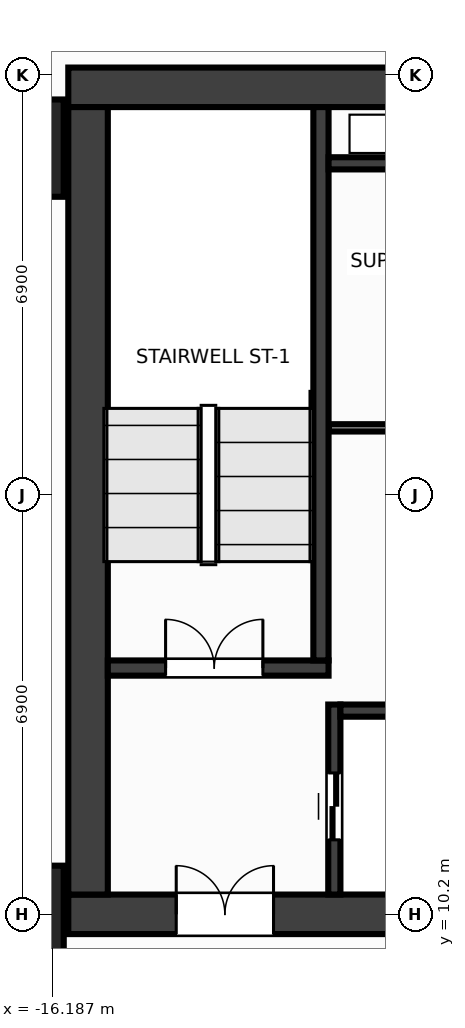
"""IFC4 building model, lengths in metres.
Left out: names, types, materials, properties, quantities, classifications, styles, units other than length and angle.
Written with IfcOpenShell. Run it as: python <this file> out.ifc"""

import sys

from ifc_helpers import new_model, si_unit, direction, frame, frame_2d, origin, origin_2d, place, context, subcontext, project, spatial, rectangle, extrude, source, transform, mapped, element, fill, save


model = new_model("IFC4")
c1 = context("Model", 3, precision=1e-05, world=origin(), true_north=direction((0.0, 1.0)))
c2 = subcontext(c1, "Body", "Model", "MODEL_VIEW")
j1 = project(units=[si_unit("LENGTHUNIT", "METRE"), si_unit("PLANEANGLEUNIT", "RADIAN")], contexts=[c1])
p1 = place(None, origin())
s1 = spatial("IfcSite", under=j1, at=p1, CompositionType="ELEMENT")
p2 = place(p1, origin())
s2 = spatial("IfcBuilding", under=s1, at=p2, CompositionType="ELEMENT")
p3 = place(p2, frame((0.0, 0.0, 120.8)))
s3 = spatial("IfcBuildingStorey", under=s2, at=p3, CompositionType="ELEMENT", Elevation=120.8)
m1 = source(origin(), c2, "Body", "SweptSolid", [
    extrude(rectangle(XDim=31.85, YDim=0.65, at=frame_2d((15.925, 0.0))), origin(), (0.0, 0.0, 1.0), 3.6),
])
p4 = place(p3, frame((-15.925, 23.8, 0.0), z_axis=(0.0, 0.0, 1.0), x_axis=(1.0, 0.0, 0.0)))
e1 = element("IfcWall", 1, at=p4, inside=s3, PredefinedType="SHEAR", context=c2, shape_type="MappedRepresentation", body=[
    mapped(m1, transform((0.0, 0.0, 0.0), x_axis=(1.0, 0.0, 0.0), y_axis=(0.0, 1.0, 0.0), z_axis=(0.0, 0.0, 1.0), scale=1.0)),
])
p5 = place(p3, frame((-15.925, 10.2, 0.0), z_axis=(0.0, 0.0, 1.0), x_axis=(1.0, 0.0, 0.0)))
e2 = element("IfcWall", 2, at=p5, inside=s3, PredefinedType="SHEAR", context=c2, shape_type="MappedRepresentation", body=[
    mapped(m1, transform((0.0, 0.0, 0.0), x_axis=(1.0, 0.0, 0.0), y_axis=(0.0, 1.0, 0.0), z_axis=(0.0, 0.0, 1.0), scale=1.0)),
])
p6 = place(p5, frame((1.775, 0.0, 0.0)))
e3 = element("IfcOpeningElement", 3, at=p6, cuts=e2, PredefinedType="OPENING", context=c2, shape_type="SweptSolid", body=[
    extrude(rectangle(XDim=1.6, YDim=2.15, at=frame_2d((0.8, 1.075))), frame((0.0, 0.337, 0.0), z_axis=(0.0, -1.0, 0.0), x_axis=(1.0, 0.0, 0.0)), (0.0, 0.0, 1.0), 0.674),
])
p7 = place(p5, frame((28.475, 0.0, 0.0)))
e4 = element("IfcOpeningElement", 4, at=p7, cuts=e2, PredefinedType="OPENING", context=c2, shape_type="SweptSolid", body=[
    extrude(rectangle(XDim=1.6, YDim=2.15, at=frame_2d((0.8, 1.075))), frame((0.0, 0.337, 0.0), z_axis=(0.0, -1.0, 0.0), x_axis=(1.0, 0.0, 0.0)), (0.0, 0.0, 1.0), 0.674),
])
p8 = place(p5, frame((15.175, 0.0, 0.0)))
e5 = element("IfcOpeningElement", 5, at=p8, cuts=e2, PredefinedType="OPENING", context=c2, shape_type="SweptSolid", body=[
    extrude(rectangle(XDim=1.5, YDim=2.2, at=frame_2d((0.75, 1.1))), frame((0.0, 0.337, 0.0), z_axis=(0.0, -1.0, 0.0), x_axis=(1.0, 0.0, 0.0)), (0.0, 0.0, 1.0), 0.674),
])
m2 = source(origin(), c2, "Body", "SweptSolid", [
    extrude(rectangle(XDim=12.95, YDim=0.65, at=frame_2d((6.475, 0.0))), origin(), (0.0, 0.0, 1.0), 3.6),
])
p9 = place(p3, frame((-15.6, 10.525, 0.0), z_axis=(0.0, 0.0, 1.0), x_axis=(0.0, 1.0, 0.0)))
e6 = element("IfcWall", 6, at=p9, inside=s3, PredefinedType="SHEAR", context=c2, shape_type="MappedRepresentation", body=[
    mapped(m2, transform((0.0, 0.0, 0.0), x_axis=(1.0, 0.0, 0.0), y_axis=(0.0, 1.0, 0.0), z_axis=(0.0, 0.0, 1.0), scale=1.0)),
])
m3 = source(origin(), c2, "Body", "SweptSolid", [
    extrude(rectangle(XDim=3.63, YDim=0.25, at=frame_2d((1.815, 0.0))), origin(), (0.0, 0.0, 1.0), 3.6),
])
p10 = place(p3, frame((-15.275, 14.25, 0.0), z_axis=(0.0, 0.0, 1.0), x_axis=(1.0, 0.0, 0.0)))
e7 = element("IfcWall", 7, at=p10, inside=s3, PredefinedType="SHEAR", context=c2, shape_type="MappedRepresentation", body=[
    mapped(m3, transform((0.0, 0.0, 0.0), x_axis=(1.0, 0.0, 0.0), y_axis=(0.0, 1.0, 0.0), z_axis=(0.0, 0.0, 1.0), scale=1.0)),
])
p11 = place(p10, frame((0.95, 0.0, 0.0)))
e8 = element("IfcOpeningElement", 8, at=p11, cuts=e7, PredefinedType="OPENING", context=c2, shape_type="SweptSolid", body=[
    extrude(rectangle(XDim=1.6, YDim=2.15, at=frame_2d((0.8, 1.075))), frame((0.0, 0.137, 0.0), z_axis=(0.0, -1.0, 0.0), x_axis=(1.0, 0.0, 0.0)), (0.0, 0.0, 1.0), 0.274),
])
m4 = source(origin(), c2, "Body", "SweptSolid", [
    extrude(rectangle(XDim=9.1, YDim=0.25, at=frame_2d((4.55, 0.0))), origin(), (0.0, 0.0, 1.0), 3.6),
])
p12 = place(p3, frame((-11.77, 14.375, 0.0), z_axis=(0.0, 0.0, 1.0), x_axis=(0.0, 1.0, 0.0)))
e9 = element("IfcWall", 9, at=p12, inside=s3, PredefinedType="SHEAR", context=c2, shape_type="MappedRepresentation", body=[
    mapped(m4, transform((0.0, 0.0, 0.0), x_axis=(1.0, 0.0, 0.0), y_axis=(0.0, 1.0, 0.0), z_axis=(0.0, 0.0, 1.0), scale=1.0)),
])
m5 = source(origin(), c2, "Body", "SweptSolid", [
    extrude(rectangle(XDim=3.125, YDim=0.2, at=frame_2d((1.562, 0.0))), origin(), (0.0, 0.0, 1.0), 3.6),
])
p13 = place(p3, frame((-11.55, 10.525, 0.0), z_axis=(0.0, 0.0, 1.0), x_axis=(0.0, 1.0, 0.0)))
e10 = element("IfcWall", 10, at=p13, inside=s3, PredefinedType="SHEAR", context=c2, shape_type="MappedRepresentation", body=[
    mapped(m5, transform((0.0, 0.0, 0.0), x_axis=(1.0, 0.0, 0.0), y_axis=(0.0, 1.0, 0.0), z_axis=(0.0, 0.0, 1.0), scale=1.0)),
])
p14 = place(p13, frame((0.9, 0.0, 0.0)))
e11 = element("IfcOpeningElement", 11, at=p14, cuts=e10, PredefinedType="OPENING", context=c2, shape_type="SweptSolid", body=[
    extrude(rectangle(XDim=1.1, YDim=2.15, at=frame_2d((0.55, 1.075))), frame((0.0, 0.112, 0.0), z_axis=(0.0, -1.0, 0.0), x_axis=(1.0, 0.0, 0.0)), (0.0, 0.0, 1.0), 0.224),
])
m6 = source(origin(), c2, "Body", "SweptSolid", [
    extrude(rectangle(XDim=2.825, YDim=0.2, at=frame_2d((1.413, 0.0))), origin(), (0.0, 0.0, 1.0), 3.6),
])
p15 = place(p3, frame((-11.45, 13.55, 0.0), z_axis=(0.0, 0.0, 1.0), x_axis=(1.0, 0.0, 0.0)))
e12 = element("IfcWall", 12, at=p15, inside=s3, PredefinedType="SHEAR", context=c2, shape_type="MappedRepresentation", body=[
    mapped(m6, transform((0.0, 0.0, 0.0), x_axis=(1.0, 0.0, 0.0), y_axis=(0.0, 1.0, 0.0), z_axis=(0.0, 0.0, 1.0), scale=1.0)),
])
m7 = source(origin(), c2, "Body", "SweptSolid", [
    extrude(rectangle(XDim=3.02, YDim=0.2, at=frame_2d((1.51, 0.0))), origin(), (0.0, 0.0, 1.0), 3.6),
])
p16 = place(p3, frame((-11.645, 22.55, 0.0), z_axis=(0.0, 0.0, 1.0), x_axis=(1.0, 0.0, 0.0)))
e13 = element("IfcWall", 13, at=p16, inside=s3, PredefinedType="SHEAR", context=c2, shape_type="MappedRepresentation", body=[
    mapped(m7, transform((0.0, 0.0, 0.0), x_axis=(1.0, 0.0, 0.0), y_axis=(0.0, 1.0, 0.0), z_axis=(0.0, 0.0, 1.0), scale=1.0)),
])
m8 = source(origin(), c2, "Body", "SweptSolid", [
    extrude(rectangle(XDim=1.6, YDim=1.6, at=origin_2d()), origin(), (0.0, 0.0, 1.0), 3.6),
])
for number, where, z_axis, x_axis in (
    (14, (-16.8, 10.2, 0.0), (0.0, 0.0, 1.0), (1.0, 0.0, 0.0)),
    (15, (-16.8, 22.8, 0.0), (0.0, 0.0, 1.0), (1.0, 0.0, 0.0)),
):
    element("IfcColumn", number, at=place(p3, frame(where, z_axis=z_axis, x_axis=x_axis)), inside=s3, PredefinedType="COLUMN", context=c2, shape_type="MappedRepresentation", body=[
        mapped(m8, transform((0.0, 0.0, 0.0), x_axis=(1.0, 0.0, 0.0), y_axis=(0.0, 1.0, 0.0), z_axis=(0.0, 0.0, 1.0), scale=1.0)),
    ])
m9 = source(origin(), c2, "Body", "SweptSolid", [
    extrude(rectangle(XDim=3.01, YDim=0.12, at=frame_2d((1.505, 0.0))), origin(), (0.0, 0.0, 1.0), 3.3),
])
p17 = place(p3, frame((-11.64, 18.2, 0.0), z_axis=(0.0, 0.0, 1.0), x_axis=(1.0, 0.0, 0.0)))
e16 = element("IfcWall", 16, at=p17, inside=s3, PredefinedType="PARTITIONING", context=c2, shape_type="MappedRepresentation", body=[
    mapped(m9, transform((0.0, 0.0, 0.0), x_axis=(1.0, 0.0, 0.0), y_axis=(0.0, 1.0, 0.0), z_axis=(0.0, 0.0, 1.0), scale=1.0)),
])
m10 = source(origin(), c2, "Body", "SweptSolid", [
    extrude(rectangle(XDim=1.6, YDim=2.15, at=frame_2d((0.8, 1.075))), frame((0.0, 0.025, 0.0), z_axis=(0.0, -1.0, 0.0), x_axis=(1.0, 0.0, 0.0)), (0.0, 0.0, 1.0), 0.05),
])
p18 = place(p11, origin())
e17 = element("IfcDoor", 17, at=p18, inside=s3, OperationType="DOUBLE_DOOR_SINGLE_SWING", PredefinedType="DOOR", context=c2, shape_type="MappedRepresentation", body=[
    mapped(m10, transform((0.0, 0.0, 0.0), x_axis=(1.0, 0.0, 0.0), y_axis=(0.0, 1.0, 0.0), z_axis=(0.0, 0.0, 1.0), scale=1.0)),
])
fill(e8, e17)
p19 = place(p6, origin())
e18 = element("IfcDoor", 18, at=p19, inside=s3, OperationType="DOUBLE_DOOR_SINGLE_SWING", PredefinedType="DOOR", context=c2, shape_type="MappedRepresentation", body=[
    mapped(m10, transform((0.0, 0.0, 0.0), x_axis=(1.0, 0.0, 0.0), y_axis=(0.0, 1.0, 0.0), z_axis=(0.0, 0.0, 1.0), scale=1.0)),
])
fill(e3, e18)
m11 = source(origin(), c2, "Body", "SweptSolid", [
    extrude(rectangle(XDim=1.1, YDim=2.15, at=frame_2d((0.55, 1.075))), frame((0.0, 0.025, 0.0), z_axis=(0.0, -1.0, 0.0), x_axis=(1.0, 0.0, 0.0)), (0.0, 0.0, 1.0), 0.05),
])
p20 = place(p14, origin())
e19 = element("IfcDoor", 19, at=p20, inside=s3, OperationType="DOUBLE_DOOR_SLIDING", PredefinedType="DOOR", context=c2, shape_type="MappedRepresentation", body=[
    mapped(m11, transform((0.0, 0.0, 0.0), x_axis=(1.0, 0.0, 0.0), y_axis=(0.0, 1.0, 0.0), z_axis=(0.0, 0.0, 1.0), scale=1.0)),
])
fill(e11, e19)
save(model, sys.argv[1])
